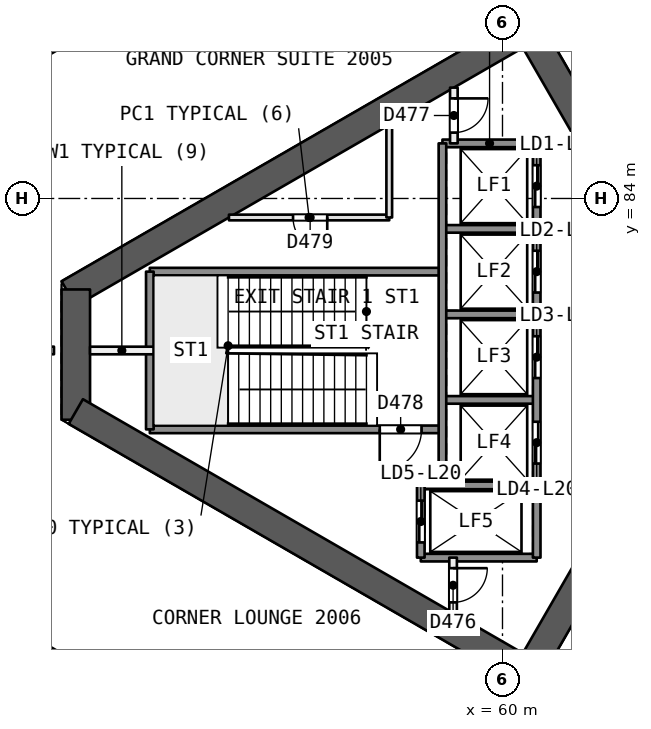
"""IFC4 building model, lengths in metres.
Left out: names, types, materials, properties, quantities, classifications, styles, units other than length and angle.
Written with IfcOpenShell. Run it as: python <this file> out.ifc"""

import sys

from ifc_helpers import new_model, si_unit, direction, frame, frame_2d, origin, place, context, subcontext, project, spatial, rectangle, extrude, element, fill, save


model = new_model("IFC4")
c1 = context("Model", 3, precision=1e-05, world=origin(), true_north=direction((0.0, 1.0)))
c2 = subcontext(c1, "Body", "Model", "MODEL_VIEW")
j1 = project(units=[si_unit("LENGTHUNIT", "METRE"), si_unit("PLANEANGLEUNIT", "RADIAN")], contexts=[c1])
p1 = place(None, origin())
s1 = spatial("IfcSite", under=j1, at=p1, CompositionType="ELEMENT")
p2 = place(p1, origin())
s2 = spatial("IfcBuilding", under=s1, at=p2, CompositionType="ELEMENT")
p3 = place(p2, frame((0.0, 0.0, 86.9)))
s3 = spatial("IfcBuildingStorey", under=s2, at=p3, CompositionType="ELEMENT", Elevation=86.9)
p4 = place(p3, frame((65.567, 80.0, 0.0), z_axis=(0.0, 0.0, 1.0), x_axis=(-0.499988615364, 0.866031976607, 0.0)))
e1 = element("IfcWall", 1, at=p4, inside=s3, PredefinedType="SHEAR", context=c2, shape_type="SweptSolid", body=[
    extrude(rectangle(XDim=10.163, YDim=0.75, at=frame_2d((5.082, 0.0))), origin(), (0.0, 0.0, 1.0), 3.7),
])
p5 = place(p4, frame((0.733, 0.0, 0.0)))
e2 = element("IfcOpeningElement", 2, at=p5, cuts=e1, PredefinedType="OPENING", context=c2, shape_type="SweptSolid", body=[
    extrude(rectangle(XDim=1.2, YDim=2.1, at=frame_2d((0.6, 1.05))), frame((0.0, 0.385, 0.0), z_axis=(0.0, -1.0, 0.0), x_axis=(1.0, 0.0, 0.0)), (0.0, 0.0, 1.0), 0.771),
])
p6 = place(p3, frame((60.673, 88.477, 0.0), z_axis=(0.0, 0.0, 1.0), x_axis=(-0.8660248072, -0.500001033313, 0.0)))
e3 = element("IfcWall", 3, at=p6, inside=s3, PredefinedType="SHEAR", context=c2, shape_type="SweptSolid", body=[
    extrude(rectangle(XDim=13.958, YDim=0.75, at=frame_2d((6.979, 0.0))), origin(), (0.0, 0.0, 1.0), 3.7),
])
p7 = place(p3, frame((48.772, 81.606, 0.0), z_axis=(0.0, 0.0, 1.0), x_axis=(0.0, -1.0, 0.0)))
e4 = element("IfcWall", 4, at=p7, inside=s3, PredefinedType="SHEAR", context=c2, shape_type="SweptSolid", body=[
    extrude(rectangle(XDim=3.429, YDim=0.75, at=frame_2d((1.714, 0.0))), origin(), (0.0, 0.0, 1.0), 3.7),
])
p8 = place(p3, frame((48.772, 78.394, 0.0), z_axis=(0.0, 0.0, 1.0), x_axis=(0.866028339916, -0.499994914436, 0.0)))
e5 = element("IfcWall", 5, at=p8, inside=s3, PredefinedType="SHEAR", context=c2, shape_type="SweptSolid", body=[
    extrude(rectangle(XDim=14.117, YDim=0.75, at=frame_2d((7.059, 0.0))), origin(), (0.0, 0.0, 1.0), 3.7),
])
p9 = place(p3, frame((60.673, 71.523, 0.0), z_axis=(0.0, 0.0, 1.0), x_axis=(0.499997052475, 0.866027105532, 0.0)))
e6 = element("IfcWall", 6, at=p9, inside=s3, PredefinedType="SHEAR", context=c2, shape_type="SweptSolid", body=[
    extrude(rectangle(XDim=10.005, YDim=0.75, at=frame_2d((5.002, 0.0))), origin(), (0.0, 0.0, 1.0), 3.7),
])
p10 = place(p9, frame((7.855, 0.0, 0.0)))
e7 = element("IfcOpeningElement", 7, at=p10, cuts=e6, PredefinedType="OPENING", context=c2, shape_type="SweptSolid", body=[
    extrude(rectangle(XDim=1.2, YDim=2.1, at=frame_2d((0.6, 1.05))), frame((0.0, 0.385, 0.0), z_axis=(0.0, -1.0, 0.0), x_axis=(1.0, 0.0, 0.0)), (0.0, 0.0, 1.0), 0.771),
])
p11 = place(p3, frame((39.633, 80.001, 0.0), z_axis=(0.0, 0.0, 1.0), x_axis=(1.0, 0.0, 0.0)))
e8 = element("IfcWall", 8, at=p11, inside=s3, PredefinedType="PARTITIONING", context=c2, shape_type="SweptSolid", body=[
    extrude(rectangle(XDim=8.565, YDim=0.2, at=frame_2d((4.283, 0.0))), origin(), (0.0, 0.0, 1.0), 3.2),
])
p12 = place(p3, frame((39.484, 82.994, 0.0), z_axis=(0.0, 0.0, 1.0), x_axis=(0.866025940441, 0.499999070483, 0.0)))
e9 = element("IfcWall", 9, at=p12, inside=s3, PredefinedType="SOLIDWALL", context=c2, shape_type="SweptSolid", body=[
    extrude(rectangle(XDim=58.522, YDim=0.3, at=frame_2d((29.261, 0.0))), origin(), (0.0, 0.0, 1.0), 3.2),
])
p13 = place(p12, frame((43.514, 0.0, 0.0)))
e10 = element("IfcOpeningElement", 10, at=p13, cuts=e9, PredefinedType="OPENING", context=c2, shape_type="SweptSolid", body=[
    extrude(rectangle(XDim=2.4, YDim=2.4, at=frame_2d((1.2, 1.2))), frame((0.0, 0.161, 0.0), z_axis=(0.0, -1.0, 0.0), x_axis=(1.0, 0.0, 0.0)), (0.0, 0.0, 1.0), 0.321),
])
p14 = place(p12, frame((12.608, 0.0, 0.0)))
e11 = element("IfcOpeningElement", 11, at=p14, cuts=e9, PredefinedType="OPENING", context=c2, shape_type="SweptSolid", body=[
    extrude(rectangle(XDim=2.4, YDim=2.4, at=frame_2d((1.2, 1.2))), frame((0.0, 0.161, 0.0), z_axis=(0.0, -1.0, 0.0), x_axis=(1.0, 0.0, 0.0)), (0.0, 0.0, 1.0), 0.321),
])
p15 = place(p12, frame((28.061, 0.0, 0.0)))
e12 = element("IfcOpeningElement", 12, at=p15, cuts=e9, PredefinedType="OPENING", context=c2, shape_type="SweptSolid", body=[
    extrude(rectangle(XDim=2.4, YDim=2.4, at=frame_2d((1.2, 1.2))), frame((0.0, 0.161, 0.0), z_axis=(0.0, -1.0, 0.0), x_axis=(1.0, 0.0, 0.0)), (0.0, 0.0, 1.0), 0.321),
])
p16 = place(p3, frame((90.165, 47.745, 0.0), z_axis=(0.0, 0.0, 1.0), x_axis=(-0.866025940441, 0.499999070483, 0.0)))
e13 = element("IfcWall", 13, at=p16, inside=s3, PredefinedType="SOLIDWALL", context=c2, shape_type="SweptSolid", body=[
    extrude(rectangle(XDim=58.522, YDim=0.3, at=frame_2d((29.261, 0.0))), origin(), (0.0, 0.0, 1.0), 3.2),
])
p17 = place(p16, frame((44.294, 0.0, 0.0)))
e14 = element("IfcOpeningElement", 14, at=p17, cuts=e13, PredefinedType="OPENING", context=c2, shape_type="SweptSolid", body=[
    extrude(rectangle(XDim=2.4, YDim=2.4, at=frame_2d((1.2, 1.2))), frame((0.0, 0.161, 0.0), z_axis=(0.0, -1.0, 0.0), x_axis=(1.0, 0.0, 0.0)), (0.0, 0.0, 1.0), 0.321),
])
p18 = place(p16, frame((22.605, 0.0, 0.0)))
e15 = element("IfcOpeningElement", 15, at=p18, cuts=e13, PredefinedType="OPENING", context=c2, shape_type="SweptSolid", body=[
    extrude(rectangle(XDim=2.4, YDim=2.4, at=frame_2d((1.2, 1.2))), frame((0.0, 0.161, 0.0), z_axis=(0.0, -1.0, 0.0), x_axis=(1.0, 0.0, 0.0)), (0.0, 0.0, 1.0), 0.321),
])
p19 = place(p16, frame((10.658, 0.0, 0.0)))
e16 = element("IfcOpeningElement", 16, at=p19, cuts=e13, PredefinedType="OPENING", context=c2, shape_type="SweptSolid", body=[
    extrude(rectangle(XDim=2.4, YDim=2.4, at=frame_2d((1.2, 1.2))), frame((0.0, 0.161, 0.0), z_axis=(0.0, -1.0, 0.0), x_axis=(1.0, 0.0, 0.0)), (0.0, 0.0, 1.0), 0.321),
])
p20 = place(p16, frame((29.92, 0.0, 0.9)))
e17 = element("IfcOpeningElement", 17, at=p20, cuts=e13, PredefinedType="OPENING", context=c2, shape_type="SweptSolid", body=[
    extrude(rectangle(XDim=1.8, YDim=1.5, at=frame_2d((0.9, 0.75))), frame((0.0, 0.161, 0.0), z_axis=(0.0, -1.0, 0.0), x_axis=(1.0, 0.0, 0.0)), (0.0, 0.0, 1.0), 0.321),
])
p21 = place(p16, frame((26.802, 0.0, 0.9)))
e18 = element("IfcOpeningElement", 18, at=p21, cuts=e13, PredefinedType="OPENING", context=c2, shape_type="SweptSolid", body=[
    extrude(rectangle(XDim=1.8, YDim=1.5, at=frame_2d((0.9, 0.75))), frame((0.0, 0.161, 0.0), z_axis=(0.0, -1.0, 0.0), x_axis=(1.0, 0.0, 0.0)), (0.0, 0.0, 1.0), 0.321),
])
p22 = place(p3, frame((60.9, 85.45, 0.0), z_axis=(0.0, 0.0, 1.0), x_axis=(-1.0, 0.0, 0.0)))
e19 = element("IfcWall", 19, at=p22, inside=s3, PredefinedType="SOLIDWALL", context=c2, shape_type="SweptSolid", body=[
    extrude(rectangle(XDim=2.48, YDim=0.2, at=frame_2d((1.24, 0.0))), origin(), (0.0, 0.0, 1.0), 3.2),
])
p23 = place(p3, frame((57.02, 83.5, 0.0), z_axis=(0.0, 0.0, 1.0), x_axis=(-1.0, 0.0, 0.0)))
e20 = element("IfcWall", 20, at=p23, inside=s3, PredefinedType="PARTITIONING", context=c2, shape_type="SweptSolid", body=[
    extrude(rectangle(XDim=4.218, YDim=0.15, at=frame_2d((2.109, 0.0))), origin(), (0.0, 0.0, 1.0), 3.2),
])
p24 = place(p23, frame((1.631, 0.0, 0.0)))
e21 = element("IfcOpeningElement", 21, at=p24, cuts=e20, PredefinedType="OPENING", context=c2, shape_type="SweptSolid", body=[
    extrude(rectangle(XDim=0.9, YDim=2.1, at=frame_2d((0.45, 1.05))), frame((0.0, 0.085, 0.0), z_axis=(0.0, -1.0, 0.0), x_axis=(1.0, 0.0, 0.0)), (0.0, 0.0, 1.0), 0.171),
])
p25 = place(p3, frame((60.9, 83.2, 0.0), z_axis=(0.0, 0.0, 1.0), x_axis=(-1.0, 0.0, 0.0)))
e22 = element("IfcWall", 22, at=p25, inside=s3, PredefinedType="SOLIDWALL", context=c2, shape_type="SweptSolid", body=[
    extrude(rectangle(XDim=2.48, YDim=0.2, at=frame_2d((1.24, 0.0))), origin(), (0.0, 0.0, 1.0), 3.2),
])
p26 = place(p3, frame((58.42, 82.075, 0.0), z_axis=(0.0, 0.0, 1.0), x_axis=(-1.0, 0.0, 0.0)))
e23 = element("IfcWall", 23, at=p26, inside=s3, PredefinedType="SOLIDWALL", context=c2, shape_type="SweptSolid", body=[
    extrude(rectangle(XDim=7.7, YDim=0.2, at=frame_2d((3.85, 0.0))), origin(), (0.0, 0.0, 1.0), 3.2),
])
p27 = place(p3, frame((60.9, 80.95, 0.0), z_axis=(0.0, 0.0, 1.0), x_axis=(-1.0, 0.0, 0.0)))
e24 = element("IfcWall", 24, at=p27, inside=s3, PredefinedType="SOLIDWALL", context=c2, shape_type="SweptSolid", body=[
    extrude(rectangle(XDim=2.48, YDim=0.2, at=frame_2d((1.24, 0.0))), origin(), (0.0, 0.0, 1.0), 3.2),
])
p28 = place(p3, frame((50.82, 80.0, 0.0), z_axis=(0.0, 0.0, 1.0), x_axis=(-1.0, 0.0, 0.0)))
e25 = element("IfcWall", 25, at=p28, inside=s3, PredefinedType="PARTITIONING", context=c2, shape_type="SweptSolid", body=[
    extrude(rectangle(XDim=1.673, YDim=0.2, at=frame_2d((0.836, 0.0))), origin(), (0.0, 0.0, 1.0), 3.2),
])
p29 = place(p3, frame((60.9, 78.7, 0.0), z_axis=(0.0, 0.0, 1.0), x_axis=(-1.0, 0.0, 0.0)))
e26 = element("IfcWall", 26, at=p29, inside=s3, PredefinedType="SOLIDWALL", context=c2, shape_type="SweptSolid", body=[
    extrude(rectangle(XDim=2.48, YDim=0.2, at=frame_2d((1.24, 0.0))), origin(), (0.0, 0.0, 1.0), 3.2),
])
p30 = place(p3, frame((58.42, 77.925, 0.0), z_axis=(0.0, 0.0, 1.0), x_axis=(-1.0, 0.0, 0.0)))
e27 = element("IfcWall", 27, at=p30, inside=s3, PredefinedType="SOLIDWALL", context=c2, shape_type="SweptSolid", body=[
    extrude(rectangle(XDim=7.7, YDim=0.2, at=frame_2d((3.85, 0.0))), origin(), (0.0, 0.0, 1.0), 3.2),
])
p31 = place(p30, frame((0.55, 0.0, 0.0)))
e28 = element("IfcOpeningElement", 28, at=p31, cuts=e27, PredefinedType="OPENING", context=c2, shape_type="SweptSolid", body=[
    extrude(rectangle(XDim=1.1, YDim=2.1, at=frame_2d((0.55, 1.05))), frame((0.0, 0.11, 0.0), z_axis=(0.0, -1.0, 0.0), x_axis=(1.0, 0.0, 0.0)), (0.0, 0.0, 1.0), 0.221),
])
for number, where, z_axis, x_axis in (
    (29, (60.9, 76.45, 0.0), (0.0, 0.0, 1.0), (-1.0, 0.0, 0.0)),
    (30, (60.9, 74.55, 0.0), (0.0, 0.0, 1.0), (-1.0, 0.0, 0.0)),
):
    element("IfcWall", number, at=place(p3, frame(where, z_axis=z_axis, x_axis=x_axis)), inside=s3, PredefinedType="SOLIDWALL", context=c2, shape_type="SweptSolid", body=[
        extrude(rectangle(XDim=3.05, YDim=0.2, at=frame_2d((1.525, 0.0))), origin(), (0.0, 0.0, 1.0), 3.2),
    ])
p32 = place(p3, frame((60.9, 85.45, 0.0), z_axis=(0.0, 0.0, 1.0), x_axis=(0.0, -1.0, 0.0)))
e31 = element("IfcWall", 31, at=p32, inside=s3, PredefinedType="SOLIDWALL", context=c2, shape_type="SweptSolid", body=[
    extrude(rectangle(XDim=10.9, YDim=0.2, at=frame_2d((5.45, 0.0))), origin(), (0.0, 0.0, 1.0), 3.2),
])
p33 = place(p32, frame((0.575, 0.0, 0.0)))
e32 = element("IfcOpeningElement", 32, at=p33, cuts=e31, PredefinedType="OPENING", context=c2, shape_type="SweptSolid", body=[
    extrude(rectangle(XDim=1.1, YDim=2.1, at=frame_2d((0.55, 1.05))), frame((0.0, 0.11, 0.0), z_axis=(0.0, -1.0, 0.0), x_axis=(1.0, 0.0, 0.0)), (0.0, 0.0, 1.0), 0.221),
])
p34 = place(p32, frame((2.825, 0.0, 0.0)))
e33 = element("IfcOpeningElement", 33, at=p34, cuts=e31, PredefinedType="OPENING", context=c2, shape_type="SweptSolid", body=[
    extrude(rectangle(XDim=1.1, YDim=2.1, at=frame_2d((0.55, 1.05))), frame((0.0, 0.11, 0.0), z_axis=(0.0, -1.0, 0.0), x_axis=(1.0, 0.0, 0.0)), (0.0, 0.0, 1.0), 0.221),
])
p35 = place(p32, frame((5.075, 0.0, 0.0)))
e34 = element("IfcOpeningElement", 34, at=p35, cuts=e31, PredefinedType="OPENING", context=c2, shape_type="SweptSolid", body=[
    extrude(rectangle(XDim=1.1, YDim=2.1, at=frame_2d((0.55, 1.05))), frame((0.0, 0.11, 0.0), z_axis=(0.0, -1.0, 0.0), x_axis=(1.0, 0.0, 0.0)), (0.0, 0.0, 1.0), 0.221),
])
p36 = place(p32, frame((7.325, 0.0, 0.0)))
e35 = element("IfcOpeningElement", 35, at=p36, cuts=e31, PredefinedType="OPENING", context=c2, shape_type="SweptSolid", body=[
    extrude(rectangle(XDim=1.1, YDim=2.1, at=frame_2d((0.55, 1.05))), frame((0.0, 0.11, 0.0), z_axis=(0.0, -1.0, 0.0), x_axis=(1.0, 0.0, 0.0)), (0.0, 0.0, 1.0), 0.221),
])
p37 = place(p3, frame((58.72, 86.917, 0.0), z_axis=(0.0, 0.0, 1.0), x_axis=(0.0, -1.0, 0.0)))
e36 = element("IfcWall", 36, at=p37, inside=s3, PredefinedType="PARTITIONING", context=c2, shape_type="SweptSolid", body=[
    extrude(rectangle(XDim=1.467, YDim=0.2, at=frame_2d((0.733, 0.0))), origin(), (0.0, 0.0, 1.0), 3.2),
])
p38 = place(p37, frame((0.283, 0.0, 0.0)))
e37 = element("IfcOpeningElement", 37, at=p38, cuts=e36, PredefinedType="OPENING", context=c2, shape_type="SweptSolid", body=[
    extrude(rectangle(XDim=0.9, YDim=2.1, at=frame_2d((0.45, 1.05))), frame((0.0, 0.11, 0.0), z_axis=(0.0, -1.0, 0.0), x_axis=(1.0, 0.0, 0.0)), (0.0, 0.0, 1.0), 0.221),
])
p39 = place(p3, frame((58.7, 74.55, 0.0), z_axis=(0.0, 0.0, 1.0), x_axis=(0.0, -1.0, 0.0)))
e38 = element("IfcWall", 38, at=p39, inside=s3, PredefinedType="PARTITIONING", context=c2, shape_type="SweptSolid", body=[
    extrude(rectangle(XDim=1.455, YDim=0.2, at=frame_2d((0.728, 0.0))), origin(), (0.0, 0.0, 1.0), 3.2),
])
p40 = place(p39, frame((0.278, 0.0, 0.0)))
e39 = element("IfcOpeningElement", 39, at=p40, cuts=e38, PredefinedType="OPENING", context=c2, shape_type="SweptSolid", body=[
    extrude(rectangle(XDim=0.9, YDim=2.1, at=frame_2d((0.45, 1.05))), frame((0.0, 0.11, 0.0), z_axis=(0.0, -1.0, 0.0), x_axis=(1.0, 0.0, 0.0)), (0.0, 0.0, 1.0), 0.221),
])
p41 = place(p3, frame((58.42, 85.45, 0.0), z_axis=(0.0, 0.0, 1.0), x_axis=(0.0, -1.0, 0.0)))
e40 = element("IfcWall", 40, at=p41, inside=s3, PredefinedType="SOLIDWALL", context=c2, shape_type="SweptSolid", body=[
    extrude(rectangle(XDim=9.0, YDim=0.2, at=frame_2d((4.5, 0.0))), origin(), (0.0, 0.0, 1.0), 3.2),
])
p42 = place(p3, frame((57.85, 76.45, 0.0), z_axis=(0.0, 0.0, 1.0), x_axis=(0.0, -1.0, 0.0)))
e41 = element("IfcWall", 41, at=p42, inside=s3, PredefinedType="SOLIDWALL", context=c2, shape_type="SweptSolid", body=[
    extrude(rectangle(XDim=1.9, YDim=0.2, at=frame_2d((0.95, 0.0))), origin(), (0.0, 0.0, 1.0), 3.2),
])
p43 = place(p42, frame((0.4, 0.0, 0.0)))
e42 = element("IfcOpeningElement", 42, at=p43, cuts=e41, PredefinedType="OPENING", context=c2, shape_type="SweptSolid", body=[
    extrude(rectangle(XDim=1.1, YDim=2.1, at=frame_2d((0.55, 1.05))), frame((0.0, 0.11, 0.0), z_axis=(0.0, -1.0, 0.0), x_axis=(1.0, 0.0, 0.0)), (0.0, 0.0, 1.0), 0.221),
])
p44 = place(p3, frame((57.02, 85.935, 0.0), z_axis=(0.0, 0.0, 1.0), x_axis=(0.0, -1.0, 0.0)))
e43 = element("IfcWall", 43, at=p44, inside=s3, PredefinedType="PARTITIONING", context=c2, shape_type="SweptSolid", body=[
    extrude(rectangle(XDim=2.435, YDim=0.15, at=frame_2d((1.218, 0.0))), origin(), (0.0, 0.0, 1.0), 3.2),
])
p45 = place(p3, frame((50.72, 82.075, 0.0), z_axis=(0.0, 0.0, 1.0), x_axis=(0.0, -1.0, 0.0)))
e44 = element("IfcWall", 44, at=p45, inside=s3, PredefinedType="SOLIDWALL", context=c2, shape_type="SweptSolid", body=[
    extrude(rectangle(XDim=4.15, YDim=0.2, at=frame_2d((2.075, 0.0))), origin(), (0.0, 0.0, 1.0), 3.2),
])
p46 = place(p33, origin())
e45 = element("IfcDoor", 45, at=p46, inside=s3, OperationType="SLIDING_TO_RIGHT", PredefinedType="NOTDEFINED", context=c2, shape_type="SweptSolid", body=[
    extrude(rectangle(XDim=1.1, YDim=2.1, at=frame_2d((0.55, 1.05))), frame((0.0, 0.025, 0.0), z_axis=(0.0, -1.0, 0.0), x_axis=(1.0, 0.0, 0.0)), (0.0, 0.0, 1.0), 0.05),
])
fill(e32, e45)
p47 = place(p34, origin())
e46 = element("IfcDoor", 46, at=p47, inside=s3, OperationType="SLIDING_TO_LEFT", PredefinedType="NOTDEFINED", context=c2, shape_type="SweptSolid", body=[
    extrude(rectangle(XDim=1.1, YDim=2.1, at=frame_2d((0.55, 1.05))), frame((0.0, 0.025, 0.0), z_axis=(0.0, -1.0, 0.0), x_axis=(1.0, 0.0, 0.0)), (0.0, 0.0, 1.0), 0.05),
])
fill(e33, e46)
p48 = place(p35, origin())
e47 = element("IfcDoor", 47, at=p48, inside=s3, OperationType="SLIDING_TO_RIGHT", PredefinedType="NOTDEFINED", context=c2, shape_type="SweptSolid", body=[
    extrude(rectangle(XDim=1.1, YDim=2.1, at=frame_2d((0.55, 1.05))), frame((0.0, 0.025, 0.0), z_axis=(0.0, -1.0, 0.0), x_axis=(1.0, 0.0, 0.0)), (0.0, 0.0, 1.0), 0.05),
])
fill(e34, e47)
p49 = place(p36, origin())
e48 = element("IfcDoor", 48, at=p49, inside=s3, OperationType="SLIDING_TO_LEFT", PredefinedType="NOTDEFINED", context=c2, shape_type="SweptSolid", body=[
    extrude(rectangle(XDim=1.1, YDim=2.1, at=frame_2d((0.55, 1.05))), frame((0.0, 0.025, 0.0), z_axis=(0.0, -1.0, 0.0), x_axis=(1.0, 0.0, 0.0)), (0.0, 0.0, 1.0), 0.05),
])
fill(e35, e48)
p50 = place(p43, origin())
e49 = element("IfcDoor", 49, at=p50, inside=s3, OperationType="SLIDING_TO_RIGHT", PredefinedType="NOTDEFINED", context=c2, shape_type="SweptSolid", body=[
    extrude(rectangle(XDim=1.1, YDim=2.1, at=frame_2d((0.55, 1.05))), frame((0.0, 0.025, 0.0), z_axis=(0.0, -1.0, 0.0), x_axis=(1.0, 0.0, 0.0)), (0.0, 0.0, 1.0), 0.05),
])
fill(e42, e49)
p51 = place(p40, origin())
e50 = element("IfcDoor", 50, at=p51, inside=s3, OperationType="SINGLE_SWING_LEFT", PredefinedType="NOTDEFINED", context=c2, shape_type="SweptSolid", body=[
    extrude(rectangle(XDim=0.9, YDim=2.1, at=frame_2d((0.45, 1.05))), frame((0.0, 0.025, 0.0), z_axis=(0.0, -1.0, 0.0), x_axis=(1.0, 0.0, 0.0)), (0.0, 0.0, 1.0), 0.05),
])
fill(e39, e50)
p52 = place(p38, origin())
e51 = element("IfcDoor", 51, at=p52, inside=s3, OperationType="SINGLE_SWING_LEFT", PredefinedType="NOTDEFINED", context=c2, shape_type="SweptSolid", body=[
    extrude(rectangle(XDim=0.9, YDim=2.1, at=frame_2d((0.45, 1.05))), frame((0.0, 0.025, 0.0), z_axis=(0.0, -1.0, 0.0), x_axis=(1.0, 0.0, 0.0)), (0.0, 0.0, 1.0), 0.05),
])
fill(e37, e51)
p53 = place(p31, origin())
e52 = element("IfcDoor", 52, at=p53, inside=s3, OperationType="SINGLE_SWING_RIGHT", PredefinedType="NOTDEFINED", context=c2, shape_type="SweptSolid", body=[
    extrude(rectangle(XDim=1.1, YDim=2.1, at=frame_2d((0.55, 1.05))), frame((0.0, 0.025, 0.0), z_axis=(0.0, -1.0, 0.0), x_axis=(1.0, 0.0, 0.0)), (0.0, 0.0, 1.0), 0.05),
])
fill(e28, e52)
p54 = place(p24, origin())
e53 = element("IfcDoor", 53, at=p54, inside=s3, OperationType="SINGLE_SWING_LEFT", PredefinedType="NOTDEFINED", context=c2, shape_type="SweptSolid", body=[
    extrude(rectangle(XDim=0.9, YDim=2.1, at=frame_2d((0.45, 1.05))), frame((0.0, 0.025, 0.0), z_axis=(0.0, -1.0, 0.0), x_axis=(1.0, 0.0, 0.0)), (0.0, 0.0, 1.0), 0.05),
])
fill(e21, e53)
save(model, sys.argv[1])
